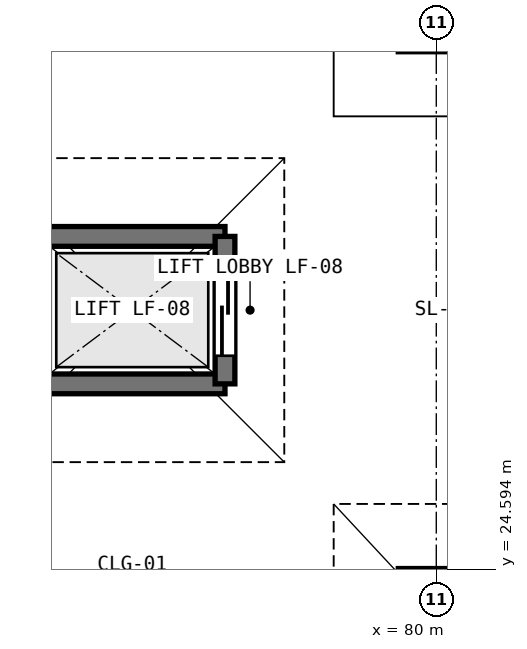
"""IFC4 building model, lengths in metres.
Left out: names, types, materials, properties, quantities, classifications, styles, units other than length and angle.
Written with IfcOpenShell. Run it as: python <this file> out.ifc"""

import sys

from ifc_helpers import new_model, si_unit, direction, frame, frame_2d, origin, place, context, subcontext, project, spatial, rectangle, extrude, element, fill, save


model = new_model("IFC4")
c1 = context("Model", 3, precision=1e-05, world=origin(), true_north=direction((0.0, 1.0)))
c2 = subcontext(c1, "Body", "Model", "MODEL_VIEW")
j1 = project(units=[si_unit("LENGTHUNIT", "METRE"), si_unit("PLANEANGLEUNIT", "RADIAN")], contexts=[c1])
p1 = place(None, origin())
s1 = spatial("IfcSite", under=j1, at=p1, CompositionType="ELEMENT")
p2 = place(p1, origin())
s2 = spatial("IfcBuilding", under=s1, at=p2, CompositionType="ELEMENT")
p3 = place(p2, frame((0.0, 0.0, 10.2)))
s3 = spatial("IfcBuildingStorey", under=s2, at=p3, CompositionType="ELEMENT", Elevation=10.2)
for number, where, z_axis, x_axis in (
    (1, (74.78, 28.97, 0.0), (0.0, 0.0, 1.0), (1.0, 0.0, 0.0)),
    (2, (77.22, 27.03, 0.0), (0.0, 0.0, 1.0), (-1.0, 0.0, 0.0)),
):
    element("IfcWall", number, at=place(p3, frame(where, z_axis=z_axis, x_axis=x_axis)), inside=s3, PredefinedType="SHEAR", context=c2, shape_type="SweptSolid", body=[
        extrude(rectangle(XDim=2.44, YDim=0.26, at=frame_2d((1.22, 0.0))), origin(), (0.0, 0.0, 1.0), 4.46),
    ])
p4 = place(p3, frame((77.22, 28.97, 0.0), z_axis=(0.0, 0.0, 1.0), x_axis=(0.0, -1.0, 0.0)))
e3 = element("IfcWall", 3, at=p4, inside=s3, PredefinedType="SHEAR", context=c2, shape_type="SweptSolid", body=[
    extrude(rectangle(XDim=1.94, YDim=0.26, at=frame_2d((0.97, 0.0))), origin(), (0.0, 0.0, 1.0), 4.46),
])
p5 = place(p4, frame((0.37, 0.0, 0.0)))
e4 = element("IfcOpeningElement", 4, at=p5, cuts=e3, PredefinedType="OPENING", context=c2, shape_type="SweptSolid", body=[
    extrude(rectangle(XDim=1.2, YDim=2.15, at=frame_2d((0.6, 1.075))), frame((0.0, 0.14, 0.0), z_axis=(0.0, -1.0, 0.0), x_axis=(1.0, 0.0, 0.0)), (0.0, 0.0, 1.0), 0.28),
])
p6 = place(p5, origin())
e5 = element("IfcDoor", 5, at=p6, inside=s3, OperationType="SLIDING_TO_LEFT", PredefinedType="DOOR", context=c2, shape_type="SweptSolid", body=[
    extrude(rectangle(XDim=1.2, YDim=2.15, at=frame_2d((0.6, 1.075))), frame((0.0, 0.025, 0.0), z_axis=(0.0, -1.0, 0.0), x_axis=(1.0, 0.0, 0.0)), (0.0, 0.0, 1.0), 0.05),
])
fill(e4, e5)
save(model, sys.argv[1])
